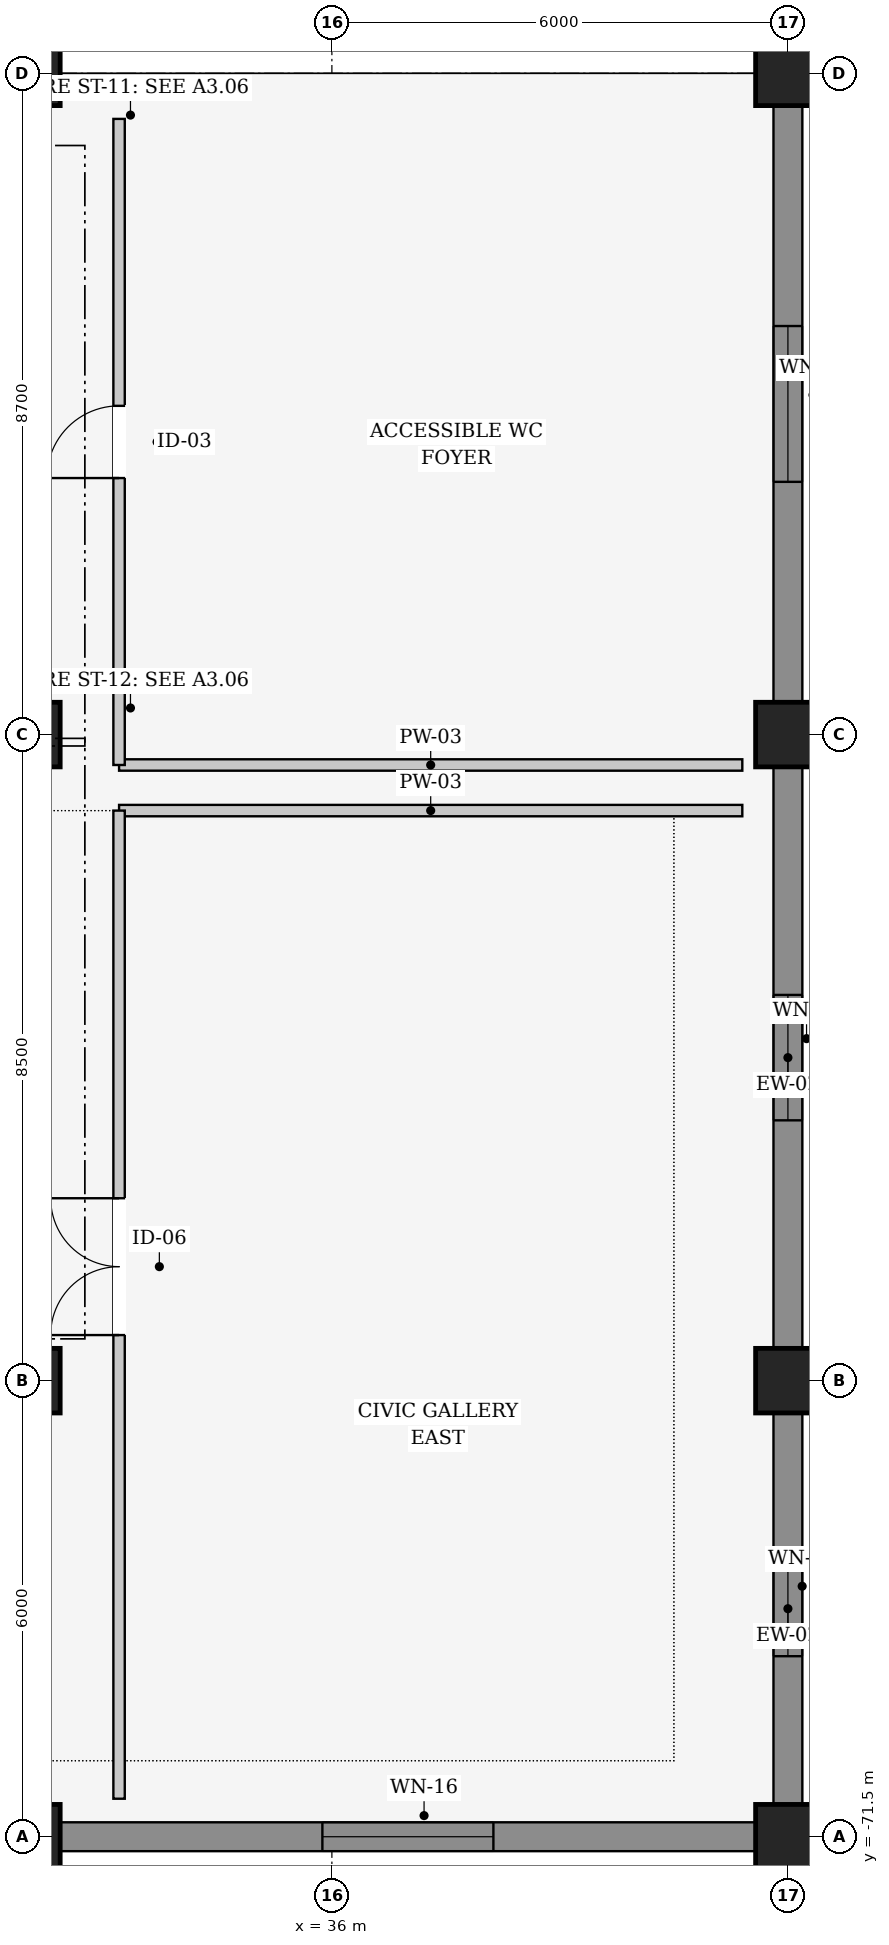
"""IFC4 building model, lengths in metres.
Left out: names, types, materials, properties, quantities, classifications, styles, units other than length and angle.
Written with IfcOpenShell. Run it as: python <this file> out.ifc"""

import sys

from ifc_helpers import new_model, si_unit, direction, frame, frame_2d, origin, origin_2d, place, context, subcontext, project, spatial, rectangle, extrude, element, fill, save


model = new_model("IFC4")
c1 = context("Model", 3, precision=1e-05, world=origin(), true_north=direction((0.0, 1.0)))
c2 = subcontext(c1, "Body", "Model", "MODEL_VIEW")
j1 = project(units=[si_unit("LENGTHUNIT", "METRE"), si_unit("PLANEANGLEUNIT", "RADIAN")], contexts=[c1])
p1 = place(None, origin())
s1 = spatial("IfcSite", under=j1, at=p1, CompositionType="ELEMENT")
p2 = place(p1, origin())
s2 = spatial("IfcBuilding", under=s1, at=p2, CompositionType="ELEMENT")
p3 = place(p2, frame((0.0, 0.0, 6.0)))
s3 = spatial("IfcBuildingStorey", under=s2, at=p3, CompositionType="ELEMENT", Elevation=6.0)
for number, where, z_axis, x_axis in (
    (1, (32.0, -71.5, 0.0), (0.0, 0.0, 1.0), (1.0, 0.0, 0.0)),
    (2, (32.0, -65.5, 0.0), (0.0, 0.0, 1.0), (1.0, 0.0, 0.0)),
    (3, (32.0, -57.0, 0.0), (0.0, 0.0, 1.0), (1.0, 0.0, 0.0)),
    (4, (32.0, -48.3, 0.0), (0.0, 0.0, 1.0), (1.0, 0.0, 0.0)),
    (5, (42.0, -71.5, 0.0), (0.0, 0.0, 1.0), (1.0, 0.0, 0.0)),
    (6, (42.0, -65.5, 0.0), (0.0, 0.0, 1.0), (1.0, 0.0, 0.0)),
    (7, (42.0, -57.0, 0.0), (0.0, 0.0, 1.0), (1.0, 0.0, 0.0)),
    (8, (42.0, -48.3, 0.0), (0.0, 0.0, 1.0), (1.0, 0.0, 0.0)),
):
    element("IfcColumn", number, at=place(p3, frame(where, z_axis=z_axis, x_axis=x_axis)), inside=s3, PredefinedType="COLUMN", context=c2, shape_type="SweptSolid", body=[
        extrude(rectangle(XDim=0.85, YDim=0.85, at=origin_2d()), origin(), (0.0, 0.0, 1.0), 5.4),
    ])
p4 = place(p3, frame((42.0, -65.907, 0.0), z_axis=(0.0, 0.0, 1.0), x_axis=(0.0, -1.0, 0.0)))
e9 = element("IfcWall", 9, at=p4, inside=s3, PredefinedType="SOLIDWALL", context=c2, shape_type="SweptSolid", body=[
    extrude(rectangle(XDim=5.186, YDim=0.38, at=frame_2d((2.593, 0.0))), origin(), (0.0, 0.0, 1.0), 4.26),
])
p5 = place(p4, frame((1.968, 0.0, 0.95)))
e10 = element("IfcOpeningElement", 10, at=p5, cuts=e9, PredefinedType="OPENING", context=c2, shape_type="SweptSolid", body=[
    extrude(rectangle(XDim=1.25, YDim=1.25, at=frame_2d((0.625, 0.625))), frame((0.0, 0.2, 0.0), z_axis=(0.0, -1.0, 0.0), x_axis=(1.0, 0.0, 0.0)), (0.0, 0.0, 1.0), 0.4),
])
p6 = place(p3, frame((42.0, -57.407, 0.0), z_axis=(0.0, 0.0, 1.0), x_axis=(0.0, -1.0, 0.0)))
e11 = element("IfcWall", 11, at=p6, inside=s3, PredefinedType="SOLIDWALL", context=c2, shape_type="SweptSolid", body=[
    extrude(rectangle(XDim=7.686, YDim=0.38, at=frame_2d((3.843, 0.0))), origin(), (0.0, 0.0, 1.0), 4.26),
])
p7 = place(p6, frame((3.018, 0.0, 0.95)))
e12 = element("IfcOpeningElement", 12, at=p7, cuts=e11, PredefinedType="OPENING", context=c2, shape_type="SweptSolid", body=[
    extrude(rectangle(XDim=1.65, YDim=1.25, at=frame_2d((0.825, 0.625))), frame((0.0, 0.2, 0.0), z_axis=(0.0, -1.0, 0.0), x_axis=(1.0, 0.0, 0.0)), (0.0, 0.0, 1.0), 0.4),
])
p8 = place(p3, frame((42.0, -48.707, 0.0), z_axis=(0.0, 0.0, 1.0), x_axis=(0.0, -1.0, 0.0)))
e13 = element("IfcWall", 13, at=p8, inside=s3, PredefinedType="SOLIDWALL", context=c2, shape_type="SweptSolid", body=[
    extrude(rectangle(XDim=7.886, YDim=0.38, at=frame_2d((3.943, 0.0))), origin(), (0.0, 0.0, 1.0), 4.26),
])
p9 = place(p8, frame((2.918, 0.0, 0.95)))
e14 = element("IfcOpeningElement", 14, at=p9, cuts=e13, PredefinedType="OPENING", context=c2, shape_type="SweptSolid", body=[
    extrude(rectangle(XDim=2.05, YDim=1.25, at=frame_2d((1.025, 0.625))), frame((0.0, 0.2, 0.0), z_axis=(0.0, -1.0, 0.0), x_axis=(1.0, 0.0, 0.0)), (0.0, 0.0, 1.0), 0.4),
])
p10 = place(p3, frame((41.593, -71.5, 0.0), z_axis=(0.0, 0.0, 1.0), x_axis=(-1.0, 0.0, 0.0)))
e15 = element("IfcWall", 15, at=p10, inside=s3, PredefinedType="SOLIDWALL", context=c2, shape_type="SweptSolid", body=[
    extrude(rectangle(XDim=9.186, YDim=0.38, at=frame_2d((4.593, 0.0))), origin(), (0.0, 0.0, 1.0), 4.26),
])
p11 = place(p10, frame((3.468, 0.0, 0.9)))
e16 = element("IfcOpeningElement", 16, at=p11, cuts=e15, PredefinedType="OPENING", context=c2, shape_type="SweptSolid", body=[
    extrude(rectangle(XDim=2.25, YDim=1.5, at=frame_2d((1.125, 0.75))), frame((0.0, 0.2, 0.0), z_axis=(0.0, -1.0, 0.0), x_axis=(1.0, 0.0, 0.0)), (0.0, 0.0, 1.0), 0.4),
])
p12 = place(p3, frame((33.2, -58.0, 0.0), z_axis=(0.0, 0.0, 1.0), x_axis=(1.0, 0.0, 0.0)))
e17 = element("IfcWall", 17, at=p12, inside=s3, PredefinedType="PARTITIONING", context=c2, shape_type="SweptSolid", body=[
    extrude(rectangle(XDim=8.2, YDim=0.15, at=frame_2d((4.1, 0.0))), origin(), (0.0, 0.0, 1.0), 5.04),
])
p13 = place(p3, frame((33.2, -71.0, 0.0), z_axis=(0.0, 0.0, 1.0), x_axis=(0.0, 1.0, 0.0)))
e18 = element("IfcWall", 18, at=p13, inside=s3, PredefinedType="PARTITIONING", context=c2, shape_type="SweptSolid", body=[
    extrude(rectangle(XDim=13.0, YDim=0.15, at=frame_2d((6.5, 0.0))), origin(), (0.0, 0.0, 1.0), 4.245),
])
p14 = place(p13, frame((6.1, 0.0, 0.0)))
e19 = element("IfcOpeningElement", 19, at=p14, cuts=e18, PredefinedType="OPENING", context=c2, shape_type="SweptSolid", body=[
    extrude(rectangle(XDim=1.8, YDim=2.2, at=frame_2d((0.9, 1.1))), frame((0.0, 0.085, 0.0), z_axis=(0.0, -1.0, 0.0), x_axis=(1.0, 0.0, 0.0)), (0.0, 0.0, 1.0), 0.17),
])
p15 = place(p3, frame((41.4, -57.4, 0.0), z_axis=(0.0, 0.0, 1.0), x_axis=(-1.0, 0.0, 0.0)))
e20 = element("IfcWall", 20, at=p15, inside=s3, PredefinedType="PARTITIONING", context=c2, shape_type="SweptSolid", body=[
    extrude(rectangle(XDim=8.2, YDim=0.15, at=frame_2d((4.1, 0.0))), origin(), (0.0, 0.0, 1.0), 4.245),
])
p16 = place(p3, frame((33.2, -57.4, 0.0), z_axis=(0.0, 0.0, 1.0), x_axis=(0.0, 1.0, 0.0)))
e21 = element("IfcWall", 21, at=p16, inside=s3, PredefinedType="PARTITIONING", context=c2, shape_type="SweptSolid", body=[
    extrude(rectangle(XDim=8.5, YDim=0.15, at=frame_2d((4.25, 0.0))), origin(), (0.0, 0.0, 1.0), 4.245),
])
p17 = place(p16, frame((3.775, 0.0, 0.0)))
e22 = element("IfcOpeningElement", 22, at=p17, cuts=e21, PredefinedType="OPENING", context=c2, shape_type="SweptSolid", body=[
    extrude(rectangle(XDim=0.95, YDim=2.15, at=frame_2d((0.475, 1.075))), frame((0.0, 0.085, 0.0), z_axis=(0.0, -1.0, 0.0), x_axis=(1.0, 0.0, 0.0)), (0.0, 0.0, 1.0), 0.17),
])
p18 = place(p5, origin())
e23 = element("IfcWindow", 23, at=p18, inside=s3, PartitioningType="SINGLE_PANEL", PredefinedType="WINDOW", context=c2, shape_type="SweptSolid", body=[
    extrude(rectangle(XDim=1.25, YDim=1.25, at=frame_2d((0.625, 0.625))), frame((0.0, 0.03, 0.0), z_axis=(0.0, -1.0, 0.0), x_axis=(1.0, 0.0, 0.0)), (0.0, 0.0, 1.0), 0.06),
])
fill(e10, e23)
p19 = place(p7, origin())
e24 = element("IfcWindow", 24, at=p19, inside=s3, PartitioningType="SINGLE_PANEL", PredefinedType="WINDOW", context=c2, shape_type="SweptSolid", body=[
    extrude(rectangle(XDim=1.65, YDim=1.25, at=frame_2d((0.825, 0.625))), frame((0.0, 0.03, 0.0), z_axis=(0.0, -1.0, 0.0), x_axis=(1.0, 0.0, 0.0)), (0.0, 0.0, 1.0), 0.06),
])
fill(e12, e24)
p20 = place(p9, origin())
e25 = element("IfcWindow", 25, at=p20, inside=s3, PartitioningType="SINGLE_PANEL", PredefinedType="WINDOW", context=c2, shape_type="SweptSolid", body=[
    extrude(rectangle(XDim=2.05, YDim=1.25, at=frame_2d((1.025, 0.625))), frame((0.0, 0.03, 0.0), z_axis=(0.0, -1.0, 0.0), x_axis=(1.0, 0.0, 0.0)), (0.0, 0.0, 1.0), 0.06),
])
fill(e14, e25)
p21 = place(p11, origin())
e26 = element("IfcWindow", 26, at=p21, inside=s3, PartitioningType="SINGLE_PANEL", PredefinedType="WINDOW", context=c2, shape_type="SweptSolid", body=[
    extrude(rectangle(XDim=2.25, YDim=1.5, at=frame_2d((1.125, 0.75))), frame((0.0, 0.03, 0.0), z_axis=(0.0, -1.0, 0.0), x_axis=(1.0, 0.0, 0.0)), (0.0, 0.0, 1.0), 0.06),
])
fill(e16, e26)
p22 = place(p14, origin())
e27 = element("IfcDoor", 27, at=p22, inside=s3, OperationType="DOUBLE_DOOR_SINGLE_SWING", PredefinedType="DOOR", context=c2, shape_type="SweptSolid", body=[
    extrude(rectangle(XDim=1.8, YDim=2.2, at=frame_2d((0.9, 1.1))), frame((0.0, 0.025, 0.0), z_axis=(0.0, -1.0, 0.0), x_axis=(1.0, 0.0, 0.0)), (0.0, 0.0, 1.0), 0.05),
])
fill(e19, e27)
p23 = place(p17, origin())
e28 = element("IfcDoor", 28, at=p23, inside=s3, OperationType="SINGLE_SWING_LEFT", PredefinedType="DOOR", context=c2, shape_type="SweptSolid", body=[
    extrude(rectangle(XDim=0.95, YDim=2.15, at=frame_2d((0.475, 1.075))), frame((0.0, 0.025, 0.0), z_axis=(0.0, -1.0, 0.0), x_axis=(1.0, 0.0, 0.0)), (0.0, 0.0, 1.0), 0.05),
])
fill(e22, e28)
save(model, sys.argv[1])
